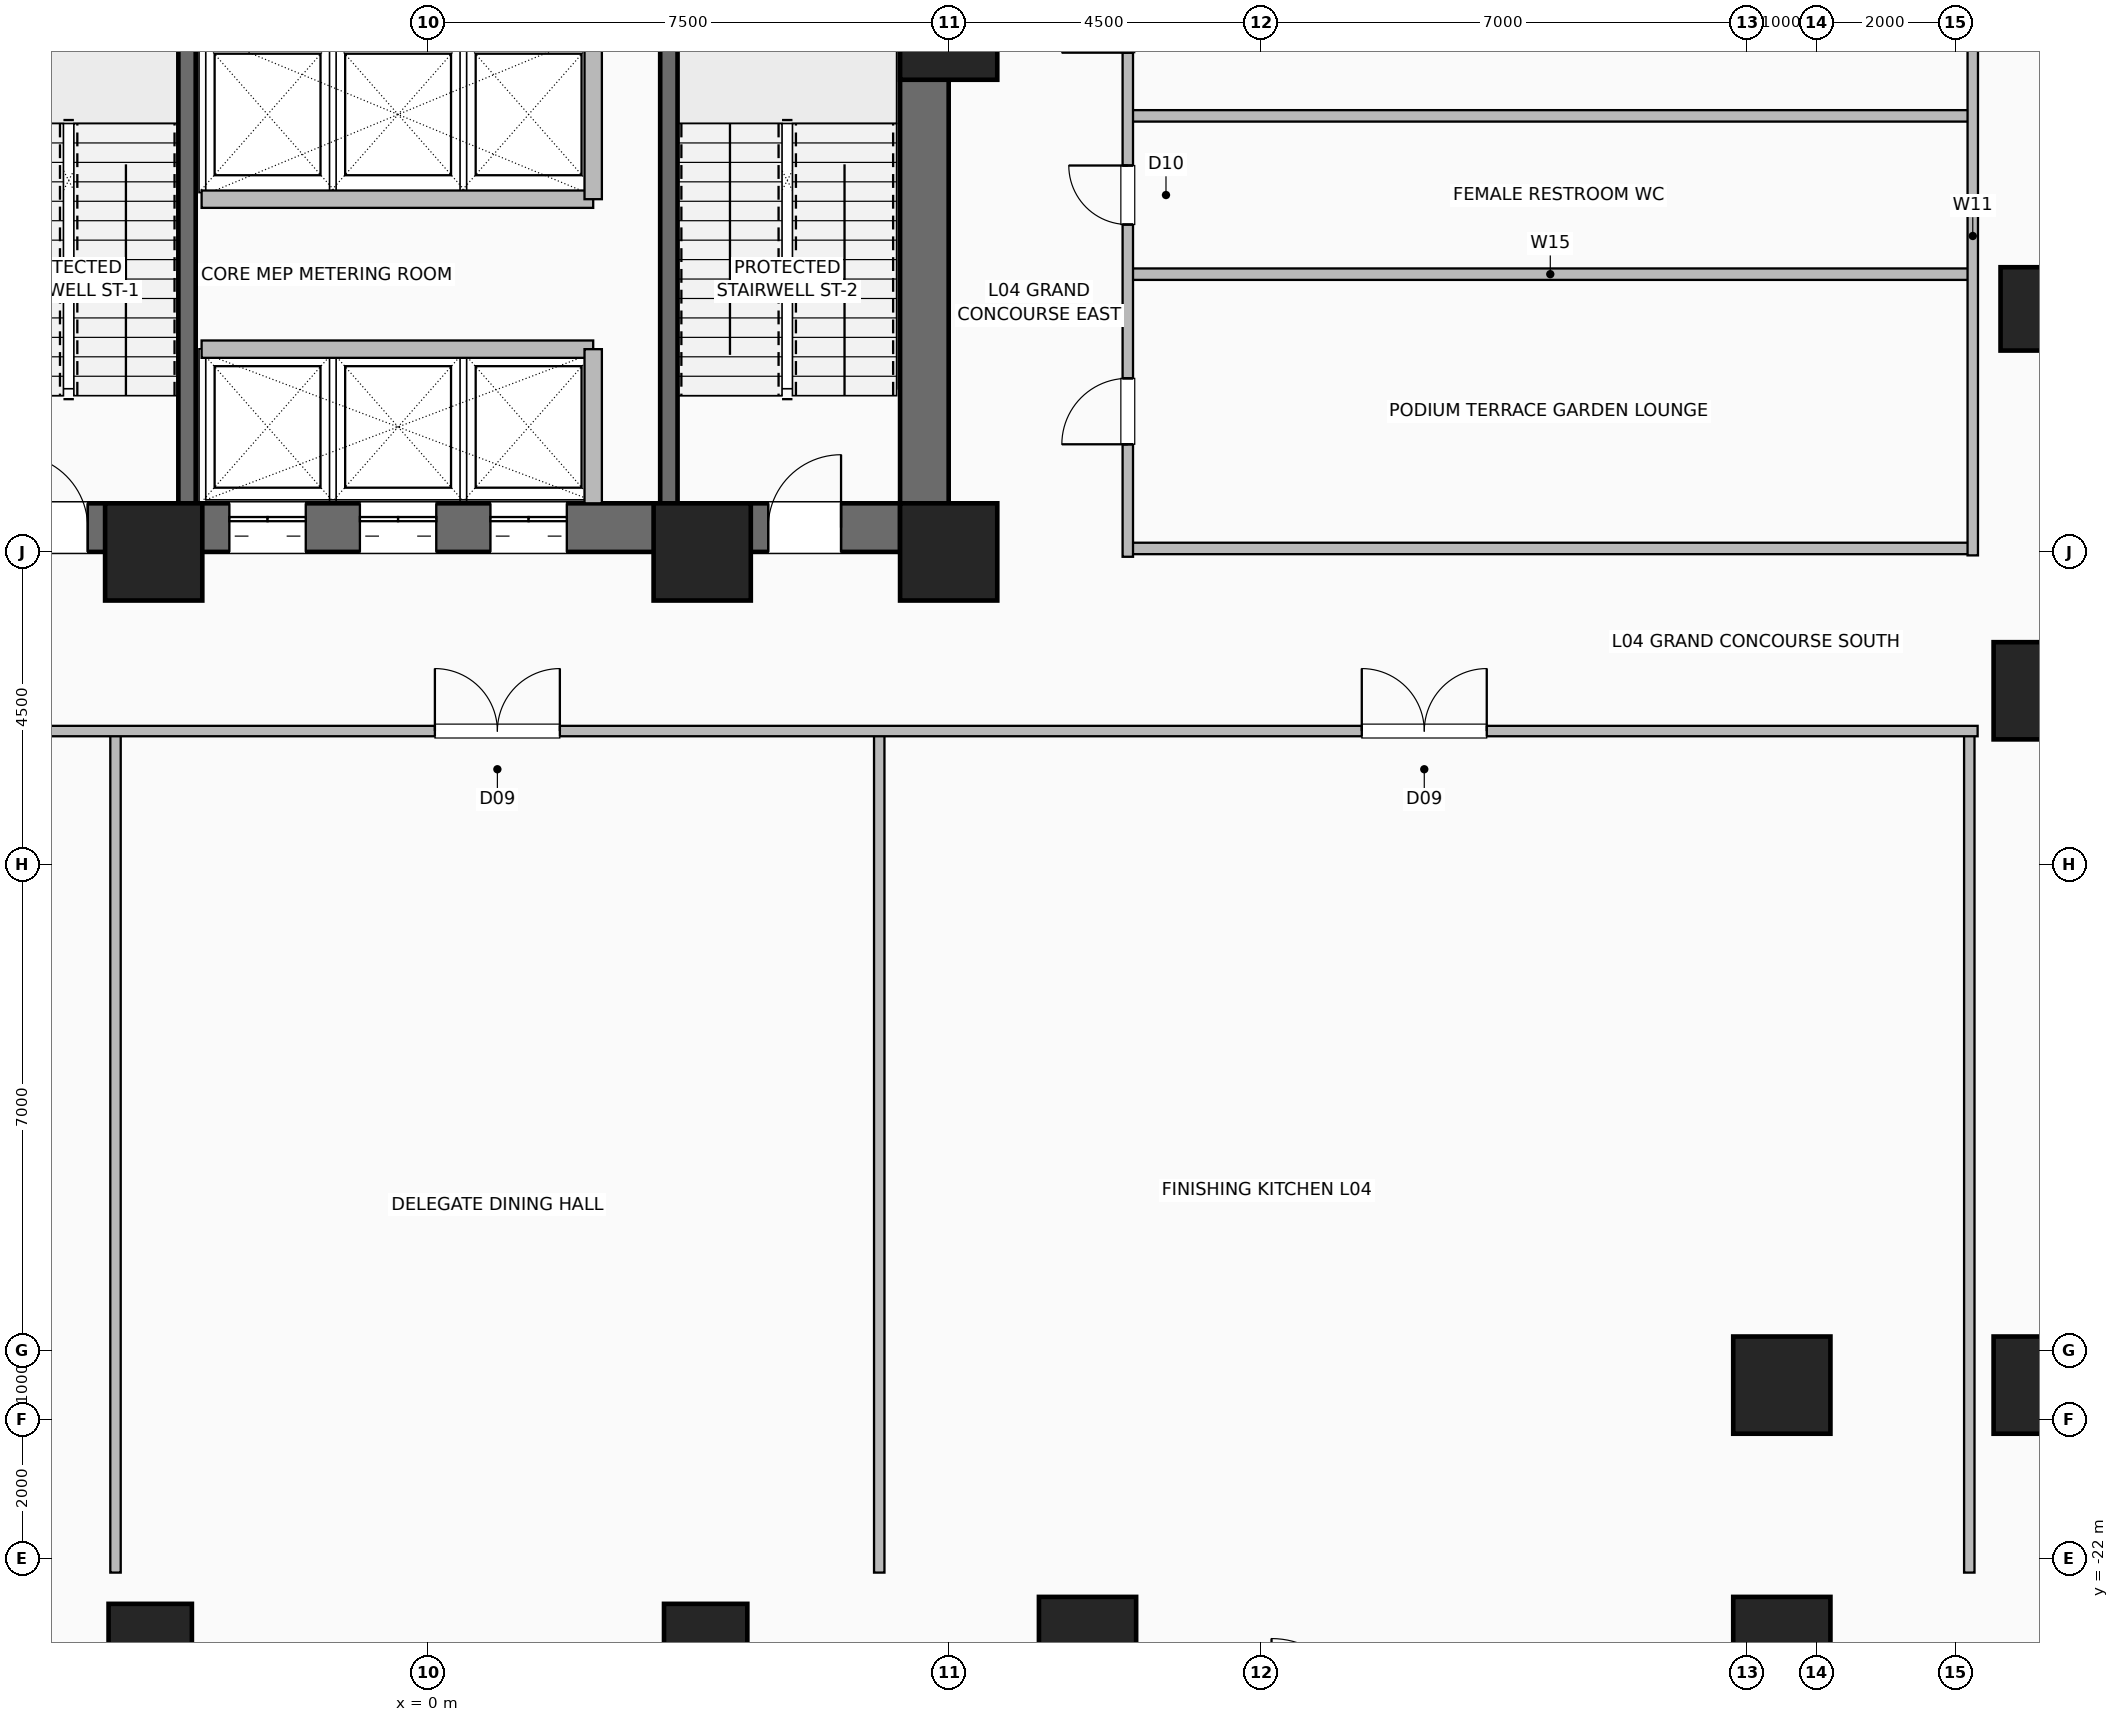
"""IFC4 building model, lengths in metres.
Left out: names, types, materials, properties, quantities, classifications, styles, units other than length and angle.
Written with IfcOpenShell. Run it as: python <this file> out.ifc"""

import sys

from ifc_helpers import new_model, si_unit, direction, frame, frame_2d, origin, origin_2d, place, context, subcontext, project, spatial, rectangle, hollow_rectangle, extrude, element, fill, save


model = new_model("IFC4")
c1 = context("Model", 3, precision=1e-05, world=origin(), true_north=direction((0.0, 1.0)))
c2 = subcontext(c1, "Body", "Model", "MODEL_VIEW")
j1 = project(units=[si_unit("LENGTHUNIT", "METRE"), si_unit("PLANEANGLEUNIT", "RADIAN")], contexts=[c1])
p1 = place(None, origin())
s1 = spatial("IfcSite", under=j1, at=p1, CompositionType="ELEMENT")
p2 = place(p1, origin())
s2 = spatial("IfcBuilding", under=s1, at=p2, CompositionType="ELEMENT")
p3 = place(p2, frame((0.0, 0.0, 21.6)))
s3 = spatial("IfcBuildingStorey", under=s2, at=p3, CompositionType="ELEMENT", Elevation=21.6)
for number, where, z_axis, x_axis in (
    (1, (-3.95, -7.5, 0.0), (0.0, 0.0, 1.0), (1.0, 0.0, 0.0)),
    (2, (3.95, -7.5, 0.0), (0.0, 0.0, 1.0), (1.0, 0.0, 0.0)),
    (3, (7.5, -7.5, 0.0), (0.0, 0.0, 1.0), (1.0, 0.0, 0.0)),
    (4, (7.5, 0.0, 0.0), (0.0, 0.0, 1.0), (1.0, 0.0, 0.0)),
):
    element("IfcColumn", number, at=place(p3, frame(where, z_axis=z_axis, x_axis=x_axis)), inside=s3, PredefinedType="COLUMN", context=c2, shape_type="SweptSolid", body=[
        extrude(hollow_rectangle(XDim=1.4, YDim=1.4, WallThickness=0.06, at=origin_2d()), origin(), (0.0, 0.0, 1.0), 5.4),
    ])
p4 = place(p3, frame((9.5, -23.25, 0.0), z_axis=(0.0, 0.0, 1.0), x_axis=(1.0, 0.0, 0.0)))
e5 = element("IfcColumn", 5, at=p4, inside=s3, PredefinedType="COLUMN", context=c2, shape_type="SweptSolid", body=[
    extrude(hollow_rectangle(XDim=1.4, YDim=1.4, WallThickness=0.06, at=origin_2d()), origin(), (0.0, 0.0, 1.0), 5.0),
])
for number, where, z_axis, x_axis in (
    (6, (19.5, -23.25, 0.0), (0.0, 0.0, 1.0), (1.0, 0.0, 0.0)),
    (7, (23.25, -19.5, 0.0), (0.0, 0.0, 1.0), (1.0, 0.0, 0.0)),
):
    element("IfcColumn", number, at=place(p3, frame(where, z_axis=z_axis, x_axis=x_axis)), inside=s3, PredefinedType="COLUMN", context=c2, shape_type="SweptSolid", body=[
        extrude(hollow_rectangle(XDim=1.4, YDim=1.4, WallThickness=0.06, at=origin_2d()), origin(), (0.0, 0.0, 1.0), 5.4),
    ])
p5 = place(p3, frame((23.25, -9.5, 0.0), z_axis=(0.0, 0.0, 1.0), x_axis=(1.0, 0.0, 0.0)))
e8 = element("IfcColumn", 8, at=p5, inside=s3, PredefinedType="COLUMN", context=c2, shape_type="SweptSolid", body=[
    extrude(hollow_rectangle(XDim=1.4, YDim=1.4, WallThickness=0.06, at=origin_2d()), origin(), (0.0, 0.0, 1.0), 5.0),
])
p6 = place(p3, frame((19.5, -19.5, 0.0), z_axis=(0.0, 0.0, 1.0), x_axis=(1.0, 0.0, 0.0)))
e9 = element("IfcColumn", 9, at=p6, inside=s3, PredefinedType="COLUMN", context=c2, shape_type="SweptSolid", body=[
    extrude(hollow_rectangle(XDim=1.4, YDim=1.4, WallThickness=0.06, at=origin_2d()), origin(), (0.0, 0.0, 1.0), 5.4),
])
for number, where, z_axis, x_axis in (
    (10, (-4.0, -23.25, -0.4), (0.0, 0.0, 1.0), (1.0, 0.0, 0.0)),
    (11, (4.0, -23.25, -0.4), (0.0, 0.0, 1.0), (1.0, 0.0, 0.0)),
    (12, (23.25, -4.0, -0.4), (0.0, 0.0, 1.0), (1.0, 0.0, 0.0)),
):
    element("IfcColumn", number, at=place(p3, frame(where, z_axis=z_axis, x_axis=x_axis)), inside=s3, PredefinedType="COLUMN", context=c2, shape_type="SweptSolid", body=[
        extrude(hollow_rectangle(XDim=1.2, YDim=1.2, WallThickness=0.055, at=origin_2d()), origin(), (0.0, 0.0, 1.0), 5.8),
    ])
p7 = place(p3, frame((-7.5, -7.15, 0.0), z_axis=(0.0, 0.0, 1.0), x_axis=(1.0, 0.0, 0.0)))
e13 = element("IfcWall", 13, at=p7, inside=s3, PredefinedType="SHEAR", context=c2, shape_type="SweptSolid", body=[
    extrude(rectangle(XDim=15.0, YDim=0.7, at=frame_2d((7.5, 0.0))), origin(), (0.0, 0.0, 1.0), 5.0),
])
p8 = place(p7, frame((1.55, 0.0, 0.0)))
e14 = element("IfcOpeningElement", 14, at=p8, cuts=e13, PredefinedType="OPENING", context=c2, shape_type="SweptSolid", body=[
    extrude(rectangle(XDim=1.05, YDim=2.08, at=frame_2d((0.525, 1.04))), frame((0.0, 0.36, 0.0), z_axis=(0.0, -1.0, 0.0), x_axis=(1.0, 0.0, 0.0)), (0.0, 0.0, 1.0), 0.72),
])
p9 = place(p7, frame((12.4, 0.0, 0.0)))
e15 = element("IfcOpeningElement", 15, at=p9, cuts=e13, PredefinedType="OPENING", context=c2, shape_type="SweptSolid", body=[
    extrude(rectangle(XDim=1.05, YDim=2.08, at=frame_2d((0.525, 1.04))), frame((0.0, 0.36, 0.0), z_axis=(0.0, -1.0, 0.0), x_axis=(1.0, 0.0, 0.0)), (0.0, 0.0, 1.0), 0.72),
])
p10 = place(p7, frame((4.64, 0.0, 0.0)))
e16 = element("IfcOpeningElement", 16, at=p10, cuts=e13, PredefinedType="OPENING", context=c2, shape_type="SweptSolid", body=[
    extrude(rectangle(XDim=1.1, YDim=2.2, at=frame_2d((0.55, 1.1))), frame((0.0, 0.36, 0.0), z_axis=(0.0, -1.0, 0.0), x_axis=(1.0, 0.0, 0.0)), (0.0, 0.0, 1.0), 0.72),
])
p11 = place(p7, frame((6.52, 0.0, 0.0)))
e17 = element("IfcOpeningElement", 17, at=p11, cuts=e13, PredefinedType="OPENING", context=c2, shape_type="SweptSolid", body=[
    extrude(rectangle(XDim=1.1, YDim=2.2, at=frame_2d((0.55, 1.1))), frame((0.0, 0.36, 0.0), z_axis=(0.0, -1.0, 0.0), x_axis=(1.0, 0.0, 0.0)), (0.0, 0.0, 1.0), 0.72),
])
p12 = place(p7, frame((8.4, 0.0, 0.0)))
e18 = element("IfcOpeningElement", 18, at=p12, cuts=e13, PredefinedType="OPENING", context=c2, shape_type="SweptSolid", body=[
    extrude(rectangle(XDim=1.1, YDim=2.2, at=frame_2d((0.55, 1.1))), frame((0.0, 0.36, 0.0), z_axis=(0.0, -1.0, 0.0), x_axis=(1.0, 0.0, 0.0)), (0.0, 0.0, 1.0), 0.72),
])
p13 = place(p3, frame((7.15, -7.5, 0.0), z_axis=(0.0, 0.0, 1.0), x_axis=(0.0, 1.0, 0.0)))
e19 = element("IfcWall", 19, at=p13, inside=s3, PredefinedType="SHEAR", context=c2, shape_type="SweptSolid", body=[
    extrude(rectangle(XDim=15.0, YDim=0.7, at=frame_2d((7.5, 0.0))), origin(), (0.0, 0.0, 1.0), 5.0),
])
p14 = place(p13, frame((12.6, 0.0, 0.0)))
e20 = element("IfcOpeningElement", 20, at=p14, cuts=e19, PredefinedType="OPENING", context=c2, shape_type="SweptSolid", body=[
    extrude(rectangle(XDim=1.2, YDim=2.2, at=frame_2d((0.6, 1.1))), frame((0.0, 0.36, 0.0), z_axis=(0.0, -1.0, 0.0), x_axis=(1.0, 0.0, 0.0)), (0.0, 0.0, 1.0), 0.72),
])
for number, where, z_axis, x_axis in (
    (21, (-3.47, -6.8, 0.0), (0.0, 0.0, 1.0), (0.0, 1.0, 0.0)),
    (22, (3.47, -6.8, 0.0), (0.0, 0.0, 1.0), (0.0, 1.0, 0.0)),
):
    element("IfcWall", number, at=place(p3, frame(where, z_axis=z_axis, x_axis=x_axis)), inside=s3, PredefinedType="SHEAR", context=c2, shape_type="SweptSolid", body=[
        extrude(rectangle(XDim=7.72, YDim=0.25, at=frame_2d((3.86, 0.0))), origin(), (0.0, 0.0, 1.0), 5.0),
    ])
p15 = place(p3, frame((-3.26, -4.58, 0.0), z_axis=(0.0, 0.0, 1.0), x_axis=(1.0, 0.0, 0.0)))
e23 = element("IfcWall", 23, at=p15, inside=s3, PredefinedType="SHEAR", context=c2, shape_type="SweptSolid", body=[
    extrude(rectangle(XDim=5.64, YDim=0.25, at=frame_2d((2.82, 0.0))), origin(), (0.0, 0.0, 1.0), 5.0),
])
p16 = place(p3, frame((2.38, -6.8, 0.0), z_axis=(0.0, 0.0, 1.0), x_axis=(0.0, 1.0, 0.0)))
e24 = element("IfcWall", 24, at=p16, inside=s3, PredefinedType="SHEAR", context=c2, shape_type="SweptSolid", body=[
    extrude(rectangle(XDim=2.22, YDim=0.25, at=frame_2d((1.11, 0.0))), origin(), (0.0, 0.0, 1.0), 5.0),
])
p17 = place(p3, frame((-3.26, -2.42, 0.0), z_axis=(0.0, 0.0, 1.0), x_axis=(1.0, 0.0, 0.0)))
e25 = element("IfcWall", 25, at=p17, inside=s3, PredefinedType="SHEAR", context=c2, shape_type="SweptSolid", body=[
    extrude(rectangle(XDim=5.64, YDim=0.25, at=frame_2d((2.82, 0.0))), origin(), (0.0, 0.0, 1.0), 5.0),
])
p18 = place(p3, frame((2.38, -2.42, 0.0), z_axis=(0.0, 0.0, 1.0), x_axis=(0.0, 1.0, 0.0)))
e26 = element("IfcWall", 26, at=p18, inside=s3, PredefinedType="SHEAR", context=c2, shape_type="SweptSolid", body=[
    extrude(rectangle(XDim=2.44, YDim=0.25, at=frame_2d((1.22, 0.0))), origin(), (0.0, 0.0, 1.0), 5.0),
])
for number, where, z_axis, x_axis in (
    (27, (-4.5, -22.2, 0.0), (0.0, 0.0, 1.0), (0.0, 1.0, 0.0)),
    (28, (6.5, -22.2, 0.0), (0.0, 0.0, 1.0), (0.0, 1.0, 0.0)),
    (29, (22.2, -22.2, 0.0), (0.0, 0.0, 1.0), (0.0, 1.0, 0.0)),
):
    element("IfcWall", number, at=place(p3, frame(where, z_axis=z_axis, x_axis=x_axis)), inside=s3, PredefinedType="PARTITIONING", context=c2, shape_type="SweptSolid", body=[
        extrude(rectangle(XDim=12.12, YDim=0.15, at=frame_2d((6.06, 0.0))), origin(), (0.0, 0.0, 1.0), 5.0),
    ])
p19 = place(p3, frame((-22.32, -10.08, 0.0), z_axis=(0.0, 0.0, 1.0), x_axis=(1.0, 0.0, 0.0)))
e30 = element("IfcWall", 30, at=p19, inside=s3, PredefinedType="PARTITIONING", context=c2, shape_type="SweptSolid", body=[
    extrude(rectangle(XDim=44.64, YDim=0.15, at=frame_2d((22.32, 0.0))), origin(), (0.0, 0.0, 1.0), 5.0),
])
p20 = place(p19, frame((8.07, 0.0, 0.0)))
e31 = element("IfcOpeningElement", 31, at=p20, cuts=e30, PredefinedType="OPENING", context=c2, shape_type="SweptSolid", body=[
    extrude(rectangle(XDim=1.8, YDim=2.08, at=frame_2d((0.9, 1.04))), frame((0.0, 0.085, 0.0), z_axis=(0.0, -1.0, 0.0), x_axis=(1.0, 0.0, 0.0)), (0.0, 0.0, 1.0), 0.17),
])
p21 = place(p19, frame((22.42, 0.0, 0.0)))
e32 = element("IfcOpeningElement", 32, at=p21, cuts=e30, PredefinedType="OPENING", context=c2, shape_type="SweptSolid", body=[
    extrude(rectangle(XDim=1.8, YDim=2.08, at=frame_2d((0.9, 1.04))), frame((0.0, 0.085, 0.0), z_axis=(0.0, -1.0, 0.0), x_axis=(1.0, 0.0, 0.0)), (0.0, 0.0, 1.0), 0.17),
])
p22 = place(p19, frame((35.77, 0.0, 0.0)))
e33 = element("IfcOpeningElement", 33, at=p22, cuts=e30, PredefinedType="OPENING", context=c2, shape_type="SweptSolid", body=[
    extrude(rectangle(XDim=1.8, YDim=2.08, at=frame_2d((0.9, 1.04))), frame((0.0, 0.085, 0.0), z_axis=(0.0, -1.0, 0.0), x_axis=(1.0, 0.0, 0.0)), (0.0, 0.0, 1.0), 0.17),
])
for number, where, z_axis, x_axis in (
    (34, (10.08, -1.22, 0.0), (0.0, 0.0, 1.0), (1.0, 0.0, 0.0)),
    (35, (10.08, -7.45, 0.0), (0.0, 0.0, 1.0), (1.0, 0.0, 0.0)),
    (36, (10.08, -3.5, 0.0), (0.0, 0.0, 1.0), (1.0, 0.0, 0.0)),
):
    element("IfcWall", number, at=place(p3, frame(where, z_axis=z_axis, x_axis=x_axis)), inside=s3, PredefinedType="PLUMBINGWALL", context=c2, shape_type="SweptSolid", body=[
        extrude(rectangle(XDim=12.17, YDim=0.165, at=frame_2d((6.085, 0.0))), origin(), (0.0, 0.0, 1.0), 5.0),
    ])
p23 = place(p3, frame((10.08, -7.57, 0.0), z_axis=(0.0, 0.0, 1.0), x_axis=(0.0, 1.0, 0.0)))
e37 = element("IfcWall", 37, at=p23, inside=s3, PredefinedType="PARTITIONING", context=c2, shape_type="SweptSolid", body=[
    extrude(rectangle(XDim=9.24, YDim=0.15, at=frame_2d((4.62, 0.0))), origin(), (0.0, 0.0, 1.0), 5.0),
])
p24 = place(p23, frame((1.62, 0.0, 0.0)))
e38 = element("IfcOpeningElement", 38, at=p24, cuts=e37, PredefinedType="OPENING", context=c2, shape_type="SweptSolid", body=[
    extrude(rectangle(XDim=0.95, YDim=2.06, at=frame_2d((0.475, 1.03))), frame((0.0, 0.085, 0.0), z_axis=(0.0, -1.0, 0.0), x_axis=(1.0, 0.0, 0.0)), (0.0, 0.0, 1.0), 0.17),
])
p25 = place(p23, frame((4.785, 0.0, 0.0)))
e39 = element("IfcOpeningElement", 39, at=p25, cuts=e37, PredefinedType="OPENING", context=c2, shape_type="SweptSolid", body=[
    extrude(rectangle(XDim=0.85, YDim=2.05, at=frame_2d((0.425, 1.025))), frame((0.0, 0.085, 0.0), z_axis=(0.0, -1.0, 0.0), x_axis=(1.0, 0.0, 0.0)), (0.0, 0.0, 1.0), 0.17),
])
p26 = place(p23, frame((7.26, 0.0, 0.0)))
e40 = element("IfcOpeningElement", 40, at=p26, cuts=e37, PredefinedType="OPENING", context=c2, shape_type="SweptSolid", body=[
    extrude(rectangle(XDim=0.95, YDim=2.06, at=frame_2d((0.475, 1.03))), frame((0.0, 0.085, 0.0), z_axis=(0.0, -1.0, 0.0), x_axis=(1.0, 0.0, 0.0)), (0.0, 0.0, 1.0), 0.17),
])
p27 = place(p3, frame((22.25, -7.55, 0.0), z_axis=(0.0, 0.0, 1.0), x_axis=(0.0, 1.0, 0.0)))
e41 = element("IfcWall", 41, at=p27, inside=s3, PredefinedType="PARTITIONING", context=c2, shape_type="SweptSolid", body=[
    extrude(rectangle(XDim=9.2, YDim=0.15, at=frame_2d((4.6, 0.0))), origin(), (0.0, 0.0, 1.0), 5.0),
])
p28 = place(p8, origin())
e42 = element("IfcDoor", 42, at=p28, inside=s3, OperationType="SINGLE_SWING_LEFT", PredefinedType="DOOR", context=c2, shape_type="SweptSolid", body=[
    extrude(rectangle(XDim=1.05, YDim=2.08, at=frame_2d((0.525, 1.04))), frame((0.0, 0.025, 0.0), z_axis=(0.0, -1.0, 0.0), x_axis=(1.0, 0.0, 0.0)), (0.0, 0.0, 1.0), 0.05),
])
fill(e14, e42)
p29 = place(p9, origin())
e43 = element("IfcDoor", 43, at=p29, inside=s3, OperationType="SINGLE_SWING_RIGHT", PredefinedType="DOOR", context=c2, shape_type="SweptSolid", body=[
    extrude(rectangle(XDim=1.05, YDim=2.08, at=frame_2d((0.525, 1.04))), frame((0.0, 0.025, 0.0), z_axis=(0.0, -1.0, 0.0), x_axis=(1.0, 0.0, 0.0)), (0.0, 0.0, 1.0), 0.05),
])
fill(e15, e43)
p30 = place(p10, origin())
e44 = element("IfcDoor", 44, at=p30, inside=s3, OperationType="DOUBLE_DOOR_SLIDING", PredefinedType="DOOR", context=c2, shape_type="SweptSolid", body=[
    extrude(rectangle(XDim=1.1, YDim=2.2, at=frame_2d((0.55, 1.1))), frame((0.0, 0.025, 0.0), z_axis=(0.0, -1.0, 0.0), x_axis=(1.0, 0.0, 0.0)), (0.0, 0.0, 1.0), 0.05),
])
fill(e16, e44)
p31 = place(p11, origin())
e45 = element("IfcDoor", 45, at=p31, inside=s3, OperationType="DOUBLE_DOOR_SLIDING", PredefinedType="DOOR", context=c2, shape_type="SweptSolid", body=[
    extrude(rectangle(XDim=1.1, YDim=2.2, at=frame_2d((0.55, 1.1))), frame((0.0, 0.025, 0.0), z_axis=(0.0, -1.0, 0.0), x_axis=(1.0, 0.0, 0.0)), (0.0, 0.0, 1.0), 0.05),
])
fill(e17, e45)
p32 = place(p12, origin())
e46 = element("IfcDoor", 46, at=p32, inside=s3, OperationType="DOUBLE_DOOR_SLIDING", PredefinedType="DOOR", context=c2, shape_type="SweptSolid", body=[
    extrude(rectangle(XDim=1.1, YDim=2.2, at=frame_2d((0.55, 1.1))), frame((0.0, 0.025, 0.0), z_axis=(0.0, -1.0, 0.0), x_axis=(1.0, 0.0, 0.0)), (0.0, 0.0, 1.0), 0.05),
])
fill(e18, e46)
p33 = place(p21, origin())
e47 = element("IfcDoor", 47, at=p33, inside=s3, OperationType="DOUBLE_DOOR_SINGLE_SWING", PredefinedType="DOOR", context=c2, shape_type="SweptSolid", body=[
    extrude(rectangle(XDim=1.8, YDim=2.08, at=frame_2d((0.9, 1.04))), frame((0.0, 0.025, 0.0), z_axis=(0.0, -1.0, 0.0), x_axis=(1.0, 0.0, 0.0)), (0.0, 0.0, 1.0), 0.05),
])
fill(e32, e47)
p34 = place(p22, origin())
e48 = element("IfcDoor", 48, at=p34, inside=s3, OperationType="DOUBLE_DOOR_SINGLE_SWING", PredefinedType="DOOR", context=c2, shape_type="SweptSolid", body=[
    extrude(rectangle(XDim=1.8, YDim=2.08, at=frame_2d((0.9, 1.04))), frame((0.0, 0.025, 0.0), z_axis=(0.0, -1.0, 0.0), x_axis=(1.0, 0.0, 0.0)), (0.0, 0.0, 1.0), 0.05),
])
fill(e33, e48)
p35 = place(p24, origin())
e49 = element("IfcDoor", 49, at=p35, inside=s3, OperationType="SINGLE_SWING_LEFT", PredefinedType="DOOR", context=c2, shape_type="SweptSolid", body=[
    extrude(rectangle(XDim=0.95, YDim=2.06, at=frame_2d((0.475, 1.03))), frame((0.0, 0.025, 0.0), z_axis=(0.0, -1.0, 0.0), x_axis=(1.0, 0.0, 0.0)), (0.0, 0.0, 1.0), 0.05),
])
fill(e38, e49)
p36 = place(p25, origin())
e50 = element("IfcDoor", 50, at=p36, inside=s3, OperationType="SINGLE_SWING_RIGHT", PredefinedType="DOOR", context=c2, shape_type="SweptSolid", body=[
    extrude(rectangle(XDim=0.85, YDim=2.05, at=frame_2d((0.425, 1.025))), frame((0.0, 0.025, 0.0), z_axis=(0.0, -1.0, 0.0), x_axis=(1.0, 0.0, 0.0)), (0.0, 0.0, 1.0), 0.05),
])
fill(e39, e50)
p37 = place(p26, origin())
e51 = element("IfcDoor", 51, at=p37, inside=s3, OperationType="SINGLE_SWING_LEFT", PredefinedType="DOOR", context=c2, shape_type="SweptSolid", body=[
    extrude(rectangle(XDim=0.95, YDim=2.06, at=frame_2d((0.475, 1.03))), frame((0.0, 0.025, 0.0), z_axis=(0.0, -1.0, 0.0), x_axis=(1.0, 0.0, 0.0)), (0.0, 0.0, 1.0), 0.05),
])
fill(e40, e51)
save(model, sys.argv[1])
